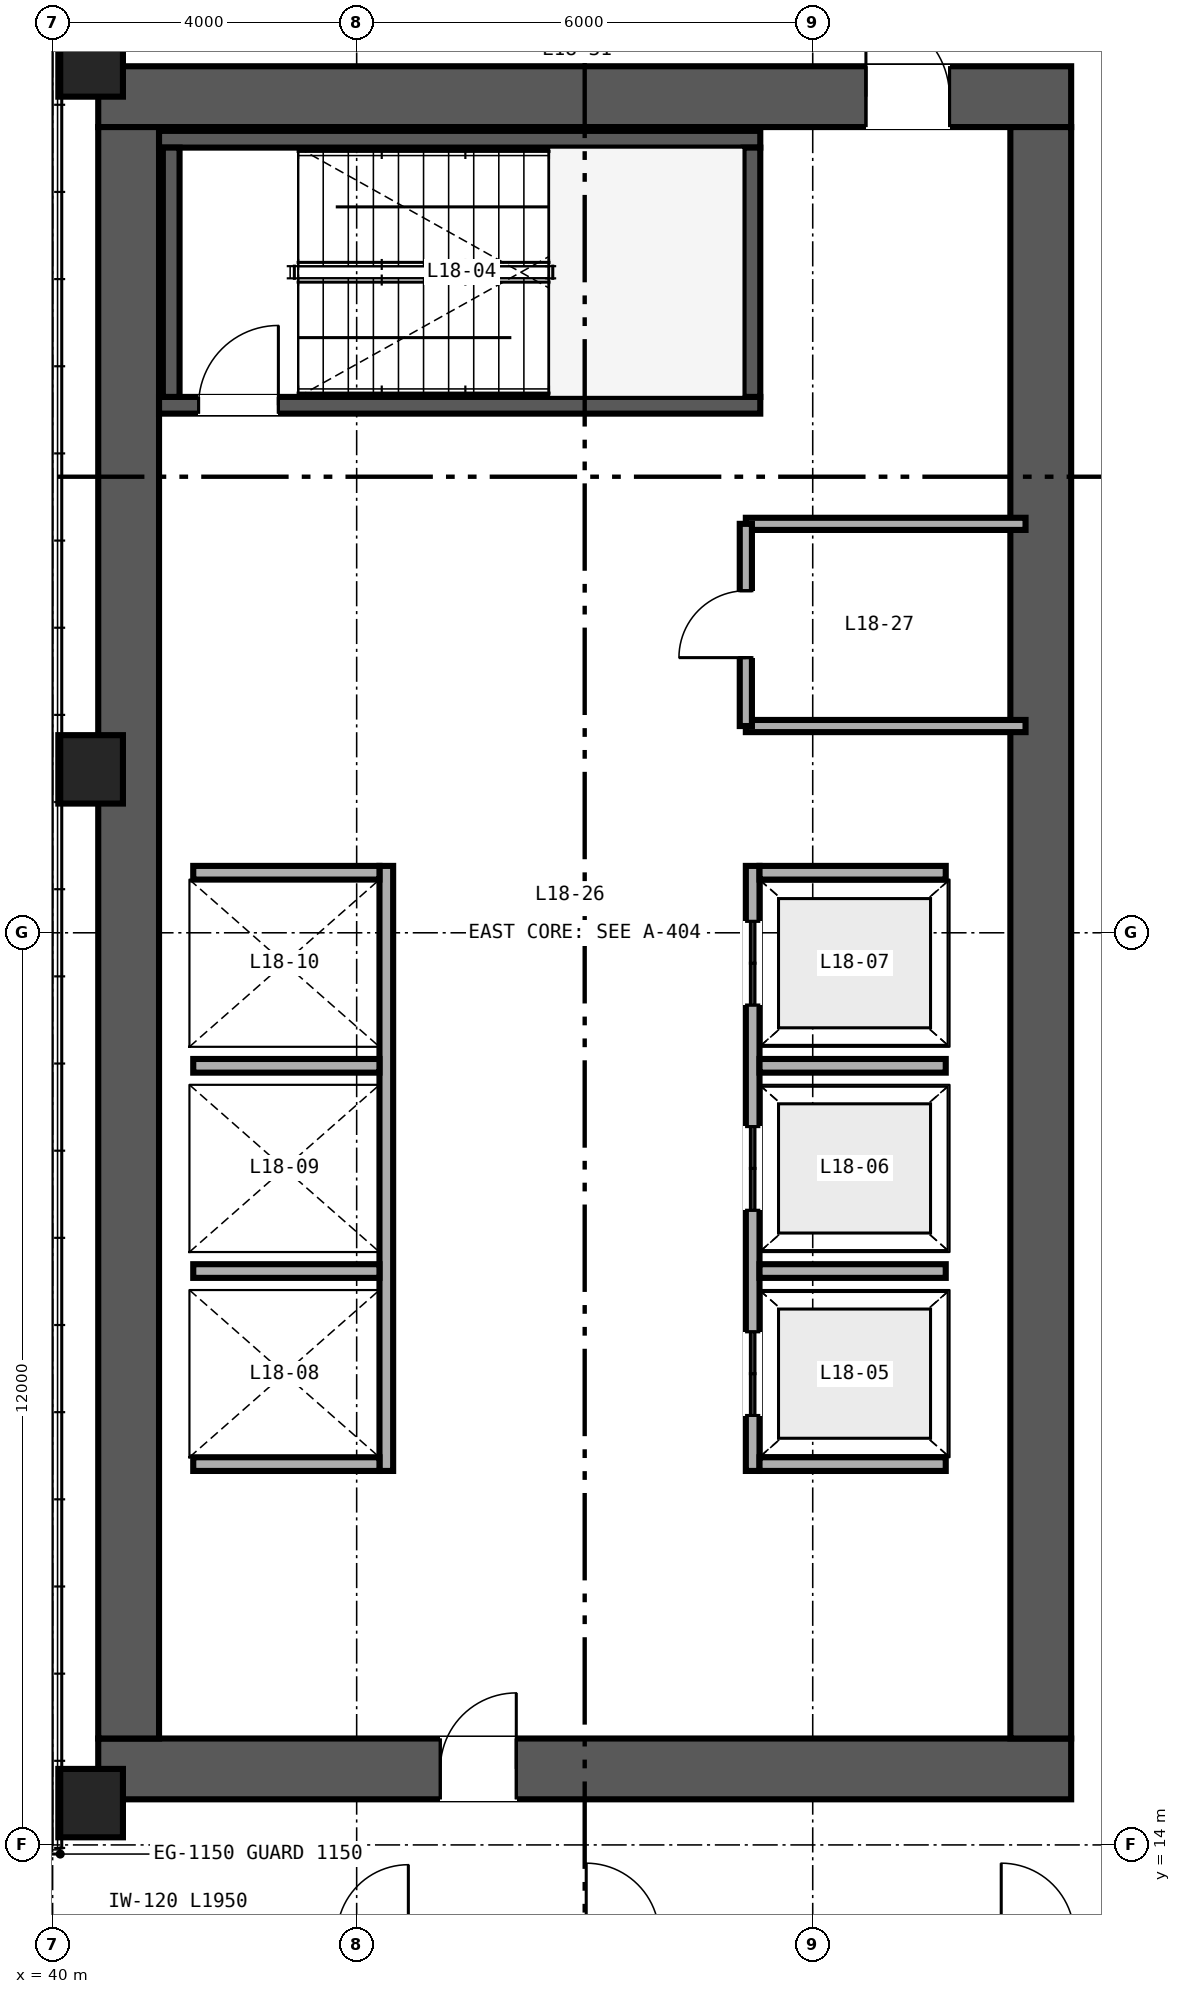
"""IFC4 building model, lengths in metres.
Left out: names, types, materials, properties, quantities, classifications, styles, units other than length and angle.
Written with IfcOpenShell. Run it as: python <this file> out.ifc"""

import sys

from ifc_helpers import new_model, si_unit, direction, frame, frame_2d, origin, origin_2d, place, context, subcontext, project, spatial, rectangle, hollow_rectangle, extrude, source, transform, mapped, element, fill, save


model = new_model("IFC4")
c1 = context("Model", 3, precision=1e-05, world=origin(), true_north=direction((0.0, 1.0)))
c2 = subcontext(c1, "Body", "Model", "MODEL_VIEW")
j1 = project(units=[si_unit("LENGTHUNIT", "METRE"), si_unit("PLANEANGLEUNIT", "RADIAN")], contexts=[c1])
p1 = place(None, origin())
s1 = spatial("IfcSite", under=j1, at=p1, CompositionType="ELEMENT")
p2 = place(p1, origin())
s2 = spatial("IfcBuilding", under=s1, at=p2, CompositionType="ELEMENT")
p3 = place(p2, frame((0.0, 0.0, 74.4)))
s3 = spatial("IfcBuildingStorey", under=s2, at=p3, CompositionType="ELEMENT", Elevation=74.4)
p4 = place(p3, frame((40.6, 15.0, 0.0), z_axis=(0.0, 0.0, 1.0), x_axis=(1.0, 0.0, 0.0)))
e1 = element("IfcWall", 1, at=p4, inside=s3, PredefinedType="SHEAR", context=c2, shape_type="SweptSolid", body=[
    extrude(rectangle(XDim=12.8, YDim=0.8, at=frame_2d((6.4, 0.0))), origin(), (0.0, 0.0, 1.0), 3.35),
])
p5 = place(p4, frame((4.5, 0.0, 0.0)))
e2 = element("IfcOpeningElement", 2, at=p5, cuts=e1, PredefinedType="OPENING", context=c2, shape_type="SweptSolid", body=[
    extrude(rectangle(XDim=1.0, YDim=2.15, at=frame_2d((0.5, 1.075))), frame((0.0, 0.41, 0.0), z_axis=(0.0, -1.0, 0.0), x_axis=(1.0, 0.0, 0.0)), (0.0, 0.0, 1.0), 0.82),
])
p6 = place(p3, frame((40.6, 37.0, 0.0), z_axis=(0.0, 0.0, 1.0), x_axis=(1.0, 0.0, 0.0)))
e3 = element("IfcWall", 3, at=p6, inside=s3, PredefinedType="SHEAR", context=c2, shape_type="SweptSolid", body=[
    extrude(rectangle(XDim=12.8, YDim=0.8, at=frame_2d((6.4, 0.0))), origin(), (0.0, 0.0, 1.0), 3.35),
])
p7 = place(p6, frame((10.1, 0.0, 0.0)))
e4 = element("IfcOpeningElement", 4, at=p7, cuts=e3, PredefinedType="OPENING", context=c2, shape_type="SweptSolid", body=[
    extrude(rectangle(XDim=1.1, YDim=2.15, at=frame_2d((0.55, 1.075))), frame((0.0, 0.41, 0.0), z_axis=(0.0, -1.0, 0.0), x_axis=(1.0, 0.0, 0.0)), (0.0, 0.0, 1.0), 0.82),
])
for number, where, z_axis, x_axis in (
    (5, (41.0, 15.4, 0.0), (0.0, 0.0, 1.0), (0.0, 1.0, 0.0)),
    (6, (53.0, 15.4, 0.0), (0.0, 0.0, 1.0), (0.0, 1.0, 0.0)),
):
    element("IfcWall", number, at=place(p3, frame(where, z_axis=z_axis, x_axis=x_axis)), inside=s3, PredefinedType="SHEAR", context=c2, shape_type="SweptSolid", body=[
        extrude(rectangle(XDim=21.2, YDim=0.8, at=frame_2d((10.6, 0.0))), origin(), (0.0, 0.0, 1.0), 3.35),
    ])
p8 = place(p3, frame((41.4, 32.94, 0.0), z_axis=(0.0, 0.0, 1.0), x_axis=(1.0, 0.0, 0.0)))
e7 = element("IfcWall", 7, at=p8, inside=s3, PredefinedType="SHEAR", context=c2, shape_type="SweptSolid", body=[
    extrude(rectangle(XDim=7.91, YDim=0.22, at=frame_2d((3.955, 0.0))), origin(), (0.0, 0.0, 1.0), 3.4),
])
p9 = place(p8, frame((0.52, 0.0, 0.0)))
e8 = element("IfcOpeningElement", 8, at=p9, cuts=e7, PredefinedType="OPENING", context=c2, shape_type="SweptSolid", body=[
    extrude(rectangle(XDim=1.05, YDim=2.15, at=frame_2d((0.525, 1.075))), frame((0.0, 0.12, 0.0), z_axis=(0.0, -1.0, 0.0), x_axis=(1.0, 0.0, 0.0)), (0.0, 0.0, 1.0), 0.24),
])
p10 = place(p3, frame((41.4, 36.44, 0.0), z_axis=(0.0, 0.0, 1.0), x_axis=(1.0, 0.0, 0.0)))
e9 = element("IfcWall", 9, at=p10, inside=s3, PredefinedType="SHEAR", context=c2, shape_type="SweptSolid", body=[
    extrude(rectangle(XDim=7.91, YDim=0.22, at=frame_2d((3.955, 0.0))), origin(), (0.0, 0.0, 1.0), 3.4),
])
for number, where, z_axis, x_axis in (
    (10, (41.56, 33.05, 0.0), (0.0, 0.0, 1.0), (0.0, 1.0, 0.0)),
    (11, (49.2, 33.05, 0.0), (0.0, 0.0, 1.0), (0.0, 1.0, 0.0)),
):
    element("IfcWall", number, at=place(p3, frame(where, z_axis=z_axis, x_axis=x_axis)), inside=s3, PredefinedType="SHEAR", context=c2, shape_type="SweptSolid", body=[
        extrude(rectangle(XDim=3.28, YDim=0.22, at=frame_2d((1.64, 0.0))), origin(), (0.0, 0.0, 1.0), 3.4),
    ])
m1 = source(origin(), c2, "Body", "SweptSolid", [
    extrude(hollow_rectangle(XDim=0.85, YDim=0.9, WallThickness=0.04, at=origin_2d()), origin(), (0.0, 0.0, 1.0), 3.35),
])
for number, where, z_axis, x_axis in (
    (12, (40.5, 14.55, 0.0), (0.0, 0.0, 1.0), (1.0, 0.0, 0.0)),
    (13, (40.5, 28.15, 0.0), (0.0, 0.0, 1.0), (1.0, 0.0, 0.0)),
    (14, (40.5, 37.45, 0.0), (0.0, 0.0, 1.0), (1.0, 0.0, 0.0)),
):
    element("IfcColumn", number, at=place(p3, frame(where, z_axis=z_axis, x_axis=x_axis)), inside=s3, PredefinedType="COLUMN", context=c2, shape_type="MappedRepresentation", body=[
        mapped(m1, transform((0.0, 0.0, 0.0), scale=1.0)),
    ])
p11 = place(p3, frame((49.21, 18.92, 0.0), z_axis=(0.0, 0.0, 1.0), x_axis=(0.0, 1.0, 0.0)))
e15 = element("IfcWall", 15, at=p11, inside=s3, PredefinedType="SOLIDWALL", context=c2, shape_type="SweptSolid", body=[
    extrude(rectangle(XDim=7.96, YDim=0.18, at=frame_2d((3.98, 0.0))), origin(), (0.0, 0.0, 1.0), 3.35),
])
p12 = place(p11, frame((0.73, 0.0, 0.0)))
e16 = element("IfcOpeningElement", 16, at=p12, cuts=e15, PredefinedType="OPENING", context=c2, shape_type="SweptSolid", body=[
    extrude(rectangle(XDim=1.1, YDim=2.2, at=frame_2d((0.55, 1.1))), frame((0.0, 0.1, 0.0), z_axis=(0.0, -1.0, 0.0), x_axis=(1.0, 0.0, 0.0)), (0.0, 0.0, 1.0), 0.2),
])
p13 = place(p11, frame((3.43, 0.0, 0.0)))
e17 = element("IfcOpeningElement", 17, at=p13, cuts=e15, PredefinedType="OPENING", context=c2, shape_type="SweptSolid", body=[
    extrude(rectangle(XDim=1.1, YDim=2.2, at=frame_2d((0.55, 1.1))), frame((0.0, 0.1, 0.0), z_axis=(0.0, -1.0, 0.0), x_axis=(1.0, 0.0, 0.0)), (0.0, 0.0, 1.0), 0.2),
])
p14 = place(p11, frame((6.13, 0.0, 0.0)))
e18 = element("IfcOpeningElement", 18, at=p14, cuts=e15, PredefinedType="OPENING", context=c2, shape_type="SweptSolid", body=[
    extrude(rectangle(XDim=1.1, YDim=2.2, at=frame_2d((0.55, 1.1))), frame((0.0, 0.1, 0.0), z_axis=(0.0, -1.0, 0.0), x_axis=(1.0, 0.0, 0.0)), (0.0, 0.0, 1.0), 0.2),
])
for number, where, z_axis, x_axis in (
    (19, (49.3, 19.01, 0.0), (0.0, 0.0, 1.0), (1.0, 0.0, 0.0)),
    (20, (49.3, 26.79, 0.0), (0.0, 0.0, 1.0), (1.0, 0.0, 0.0)),
    (21, (49.3, 21.55, 0.0), (0.0, 0.0, 1.0), (1.0, 0.0, 0.0)),
    (22, (49.3, 24.25, 0.0), (0.0, 0.0, 1.0), (1.0, 0.0, 0.0)),
):
    element("IfcWall", number, at=place(p3, frame(where, z_axis=z_axis, x_axis=x_axis)), inside=s3, PredefinedType="SOLIDWALL", context=c2, shape_type="SweptSolid", body=[
        extrude(rectangle(XDim=2.45, YDim=0.18, at=frame_2d((1.225, 0.0))), origin(), (0.0, 0.0, 1.0), 3.35),
    ])
p15 = place(p3, frame((44.39, 18.92, 0.0), z_axis=(0.0, 0.0, 1.0), x_axis=(0.0, 1.0, 0.0)))
e23 = element("IfcWall", 23, at=p15, inside=s3, PredefinedType="SOLIDWALL", context=c2, shape_type="SweptSolid", body=[
    extrude(rectangle(XDim=7.96, YDim=0.18, at=frame_2d((3.98, 0.0))), origin(), (0.0, 0.0, 1.0), 3.35),
])
for number, where, z_axis, x_axis in (
    (24, (41.85, 19.01, 0.0), (0.0, 0.0, 1.0), (1.0, 0.0, 0.0)),
    (25, (41.85, 26.79, 0.0), (0.0, 0.0, 1.0), (1.0, 0.0, 0.0)),
    (26, (41.85, 21.55, 0.0), (0.0, 0.0, 1.0), (1.0, 0.0, 0.0)),
    (27, (41.85, 24.25, 0.0), (0.0, 0.0, 1.0), (1.0, 0.0, 0.0)),
):
    element("IfcWall", number, at=place(p3, frame(where, z_axis=z_axis, x_axis=x_axis)), inside=s3, PredefinedType="SOLIDWALL", context=c2, shape_type="SweptSolid", body=[
        extrude(rectangle(XDim=2.45, YDim=0.18, at=frame_2d((1.225, 0.0))), origin(), (0.0, 0.0, 1.0), 3.35),
    ])
p16 = place(p3, frame((49.12, 28.72, 0.0), z_axis=(0.0, 0.0, 1.0), x_axis=(1.0, 0.0, 0.0)))
e28 = element("IfcWall", 28, at=p16, inside=s3, PredefinedType="PARTITIONING", context=c2, shape_type="SweptSolid", body=[
    extrude(rectangle(XDim=3.68, YDim=0.16, at=frame_2d((1.84, 0.0))), origin(), (0.0, 0.0, 1.0), 3.35),
])
p17 = place(p3, frame((49.12, 31.38, 0.0), z_axis=(0.0, 0.0, 1.0), x_axis=(1.0, 0.0, 0.0)))
e29 = element("IfcWall", 29, at=p17, inside=s3, PredefinedType="PARTITIONING", context=c2, shape_type="SweptSolid", body=[
    extrude(rectangle(XDim=3.68, YDim=0.16, at=frame_2d((1.84, 0.0))), origin(), (0.0, 0.0, 1.0), 2.36),
])
p18 = place(p3, frame((49.12, 28.72, 0.0), z_axis=(0.0, 0.0, 1.0), x_axis=(0.0, 1.0, 0.0)))
e30 = element("IfcWall", 30, at=p18, inside=s3, PredefinedType="PARTITIONING", context=c2, shape_type="SweptSolid", body=[
    extrude(rectangle(XDim=2.66, YDim=0.16, at=frame_2d((1.33, 0.0))), origin(), (0.0, 0.0, 1.0), 2.36),
])
p19 = place(p18, frame((0.9, 0.0, 0.0)))
e31 = element("IfcOpeningElement", 31, at=p19, cuts=e30, PredefinedType="OPENING", context=c2, shape_type="SweptSolid", body=[
    extrude(rectangle(XDim=0.88, YDim=2.15, at=frame_2d((0.44, 1.075))), frame((0.0, 0.09, 0.0), z_axis=(0.0, -1.0, 0.0), x_axis=(1.0, 0.0, 0.0)), (0.0, 0.0, 1.0), 0.18),
])
m2 = source(origin(), c2, "Body", "SweptSolid", [
    extrude(rectangle(XDim=1.05, YDim=2.15, at=frame_2d((0.525, 1.075))), frame((0.0, 0.025, 0.0), z_axis=(0.0, -1.0, 0.0), x_axis=(1.0, 0.0, 0.0)), (0.0, 0.0, 1.0), 0.05),
])
p20 = place(p9, origin())
e32 = element("IfcDoor", 32, at=p20, inside=s3, OperationType="SINGLE_SWING_RIGHT", PredefinedType="DOOR", context=c2, shape_type="MappedRepresentation", body=[
    mapped(m2, transform((0.0, 0.0, 0.0), scale=1.0)),
])
fill(e8, e32)
m3 = source(origin(), c2, "Body", "SweptSolid", [
    extrude(rectangle(XDim=1.1, YDim=2.2, at=frame_2d((0.55, 1.1))), frame((0.0, 0.025, 0.0), z_axis=(0.0, -1.0, 0.0), x_axis=(1.0, 0.0, 0.0)), (0.0, 0.0, 1.0), 0.05),
])
p21 = place(p12, origin())
e33 = element("IfcDoor", 33, at=p21, inside=s3, OperationType="DOUBLE_DOOR_SLIDING", PredefinedType="DOOR", context=c2, shape_type="MappedRepresentation", body=[
    mapped(m3, transform((0.0, 0.0, 0.0), scale=1.0)),
])
fill(e16, e33)
p22 = place(p13, origin())
e34 = element("IfcDoor", 34, at=p22, inside=s3, OperationType="DOUBLE_DOOR_SLIDING", PredefinedType="DOOR", context=c2, shape_type="MappedRepresentation", body=[
    mapped(m3, transform((0.0, 0.0, 0.0), scale=1.0)),
])
fill(e17, e34)
p23 = place(p14, origin())
e35 = element("IfcDoor", 35, at=p23, inside=s3, OperationType="DOUBLE_DOOR_SLIDING", PredefinedType="DOOR", context=c2, shape_type="MappedRepresentation", body=[
    mapped(m3, transform((0.0, 0.0, 0.0), scale=1.0)),
])
fill(e18, e35)
m4 = source(origin(), c2, "Body", "SweptSolid", [
    extrude(rectangle(XDim=1.0, YDim=2.15, at=frame_2d((0.5, 1.075))), frame((0.0, 0.025, 0.0), z_axis=(0.0, -1.0, 0.0), x_axis=(1.0, 0.0, 0.0)), (0.0, 0.0, 1.0), 0.05),
])
p24 = place(p5, origin())
e36 = element("IfcDoor", 36, at=p24, inside=s3, OperationType="SINGLE_SWING_RIGHT", PredefinedType="DOOR", context=c2, shape_type="MappedRepresentation", body=[
    mapped(m4, transform((0.0, 0.0, 0.0), scale=1.0)),
])
fill(e2, e36)
m5 = source(origin(), c2, "Body", "SweptSolid", [
    extrude(rectangle(XDim=1.1, YDim=2.15, at=frame_2d((0.55, 1.075))), frame((0.0, 0.025, 0.0), z_axis=(0.0, -1.0, 0.0), x_axis=(1.0, 0.0, 0.0)), (0.0, 0.0, 1.0), 0.05),
])
p25 = place(p7, origin())
e37 = element("IfcDoor", 37, at=p25, inside=s3, OperationType="SINGLE_SWING_LEFT", PredefinedType="DOOR", context=c2, shape_type="MappedRepresentation", body=[
    mapped(m5, transform((0.0, 0.0, 0.0), scale=1.0)),
])
fill(e4, e37)
m6 = source(origin(), c2, "Body", "SweptSolid", [
    extrude(rectangle(XDim=0.88, YDim=2.15, at=frame_2d((0.44, 1.075))), frame((0.0, 0.025, 0.0), z_axis=(0.0, -1.0, 0.0), x_axis=(1.0, 0.0, 0.0)), (0.0, 0.0, 1.0), 0.05),
])
p26 = place(p19, origin())
e38 = element("IfcDoor", 38, at=p26, inside=s3, OperationType="SINGLE_SWING_LEFT", PredefinedType="DOOR", context=c2, shape_type="MappedRepresentation", body=[
    mapped(m6, transform((0.0, 0.0, 0.0), scale=1.0)),
])
fill(e31, e38)
save(model, sys.argv[1])
